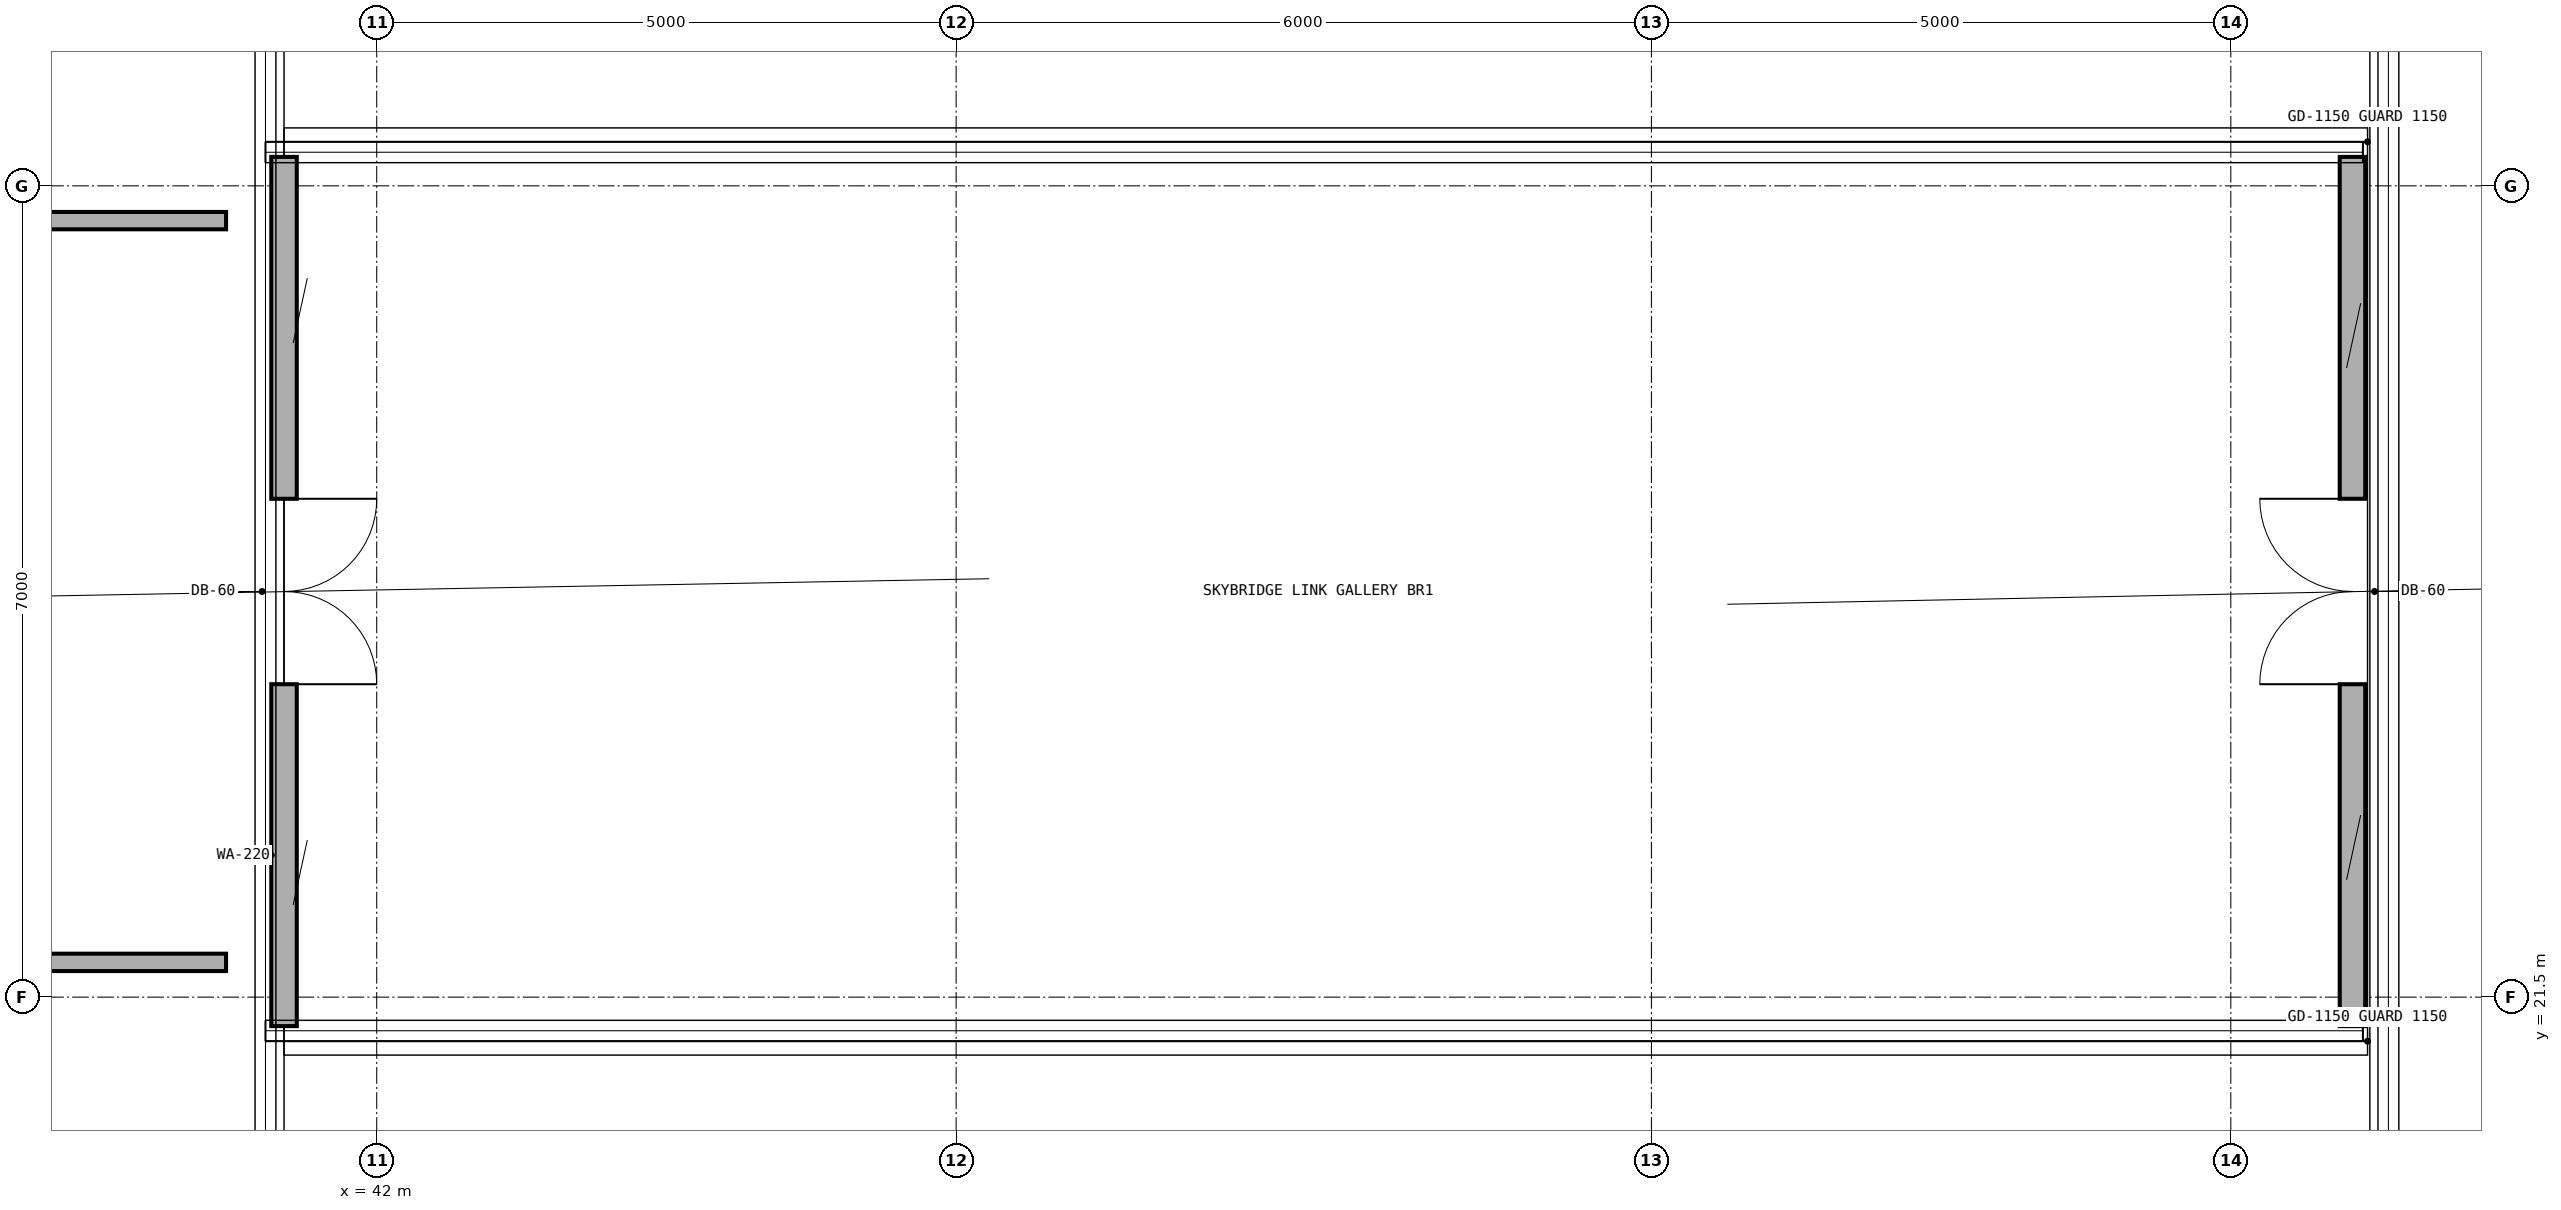
"""IFC4 building model, lengths in metres.
Left out: names, types, materials, properties, quantities, classifications, styles, units other than length and angle.
Written with IfcOpenShell. Run it as: python <this file> out.ifc"""

import sys

from ifc_helpers import new_model, si_unit, direction, frame, frame_2d, origin, place, context, subcontext, project, spatial, rectangle, extrude, element, fill, save


model = new_model("IFC4")
c1 = context("Model", 3, precision=1e-05, world=origin(), true_north=direction((0.0, 1.0)))
c2 = subcontext(c1, "Body", "Model", "MODEL_VIEW")
j1 = project(units=[si_unit("LENGTHUNIT", "METRE"), si_unit("PLANEANGLEUNIT", "RADIAN")], contexts=[c1])
p1 = place(None, origin())
s1 = spatial("IfcSite", under=j1, at=p1, CompositionType="ELEMENT")
p2 = place(p1, origin())
s2 = spatial("IfcBuilding", under=s1, at=p2, CompositionType="ELEMENT")
p3 = place(p2, frame((0.0, 0.0, 119.5)))
s3 = spatial("IfcBuildingStorey", under=s2, at=p3, CompositionType="ELEMENT", Elevation=119.5)
for number, where, z_axis, x_axis in (
    (1, (32.66, 21.8, 0.0), (0.0, 0.0, 1.0), (1.0, 0.0, 0.0)),
    (2, (32.66, 28.2, 0.0), (0.0, 0.0, 1.0), (1.0, 0.0, 0.0)),
):
    element("IfcWall", number, at=place(p3, frame(where, z_axis=z_axis, x_axis=x_axis)), inside=s3, PredefinedType="PARTITIONING", context=c2, shape_type="SweptSolid", body=[
        extrude(rectangle(XDim=8.04, YDim=0.15, at=frame_2d((4.02, 0.0))), origin(), (0.0, 0.0, 1.0), 3.835),
    ])
p4 = place(p3, frame((41.2, 21.25, 0.0), z_axis=(0.0, 0.0, 1.0), x_axis=(0.0, 1.0, 0.0)))
e3 = element("IfcWall", 3, at=p4, inside=s3, PredefinedType="SOLIDWALL", context=c2, shape_type="SweptSolid", body=[
    extrude(rectangle(XDim=7.5, YDim=0.22, at=frame_2d((3.75, 0.0))), origin(), (0.0, 0.0, 1.0), 3.795),
])
p5 = place(p4, frame((2.95, 0.0, 0.0)))
e4 = element("IfcOpeningElement", 4, at=p5, cuts=e3, PredefinedType="OPENING", context=c2, shape_type="SweptSolid", body=[
    extrude(rectangle(XDim=1.6, YDim=2.15, at=frame_2d((0.8, 1.075))), frame((0.0, 0.12, 0.0), z_axis=(0.0, -1.0, 0.0), x_axis=(1.0, 0.0, 0.0)), (0.0, 0.0, 1.0), 0.24),
])
p6 = place(p3, frame((59.05, 21.25, 0.0), z_axis=(0.0, 0.0, 1.0), x_axis=(0.0, 1.0, 0.0)))
e5 = element("IfcWall", 5, at=p6, inside=s3, PredefinedType="SOLIDWALL", context=c2, shape_type="SweptSolid", body=[
    extrude(rectangle(XDim=7.5, YDim=0.22, at=frame_2d((3.75, 0.0))), origin(), (0.0, 0.0, 1.0), 3.795),
])
p7 = place(p6, frame((2.95, 0.0, 0.0)))
e6 = element("IfcOpeningElement", 6, at=p7, cuts=e5, PredefinedType="OPENING", context=c2, shape_type="SweptSolid", body=[
    extrude(rectangle(XDim=1.6, YDim=2.15, at=frame_2d((0.8, 1.075))), frame((0.0, 0.12, 0.0), z_axis=(0.0, -1.0, 0.0), x_axis=(1.0, 0.0, 0.0)), (0.0, 0.0, 1.0), 0.24),
])
p8 = place(p5, frame((1.6, 0.0, 0.0), z_axis=(0.0, 0.0, 1.0), x_axis=(-1.0, 0.0, 0.0)))
e7 = element("IfcDoor", 7, at=p8, inside=s3, OperationType="DOUBLE_DOOR_SINGLE_SWING", PredefinedType="DOOR", context=c2, shape_type="SweptSolid", body=[
    extrude(rectangle(XDim=1.6, YDim=2.15, at=frame_2d((0.8, 1.075))), frame((0.0, 0.025, 0.0), z_axis=(0.0, -1.0, 0.0), x_axis=(1.0, 0.0, 0.0)), (0.0, 0.0, 1.0), 0.05),
])
fill(e4, e7)
p9 = place(p7, origin())
e8 = element("IfcDoor", 8, at=p9, inside=s3, OperationType="DOUBLE_DOOR_SINGLE_SWING", PredefinedType="DOOR", context=c2, shape_type="SweptSolid", body=[
    extrude(rectangle(XDim=1.6, YDim=2.15, at=frame_2d((0.8, 1.075))), frame((0.0, 0.025, 0.0), z_axis=(0.0, -1.0, 0.0), x_axis=(1.0, 0.0, 0.0)), (0.0, 0.0, 1.0), 0.05),
])
fill(e6, e8)
save(model, sys.argv[1])
